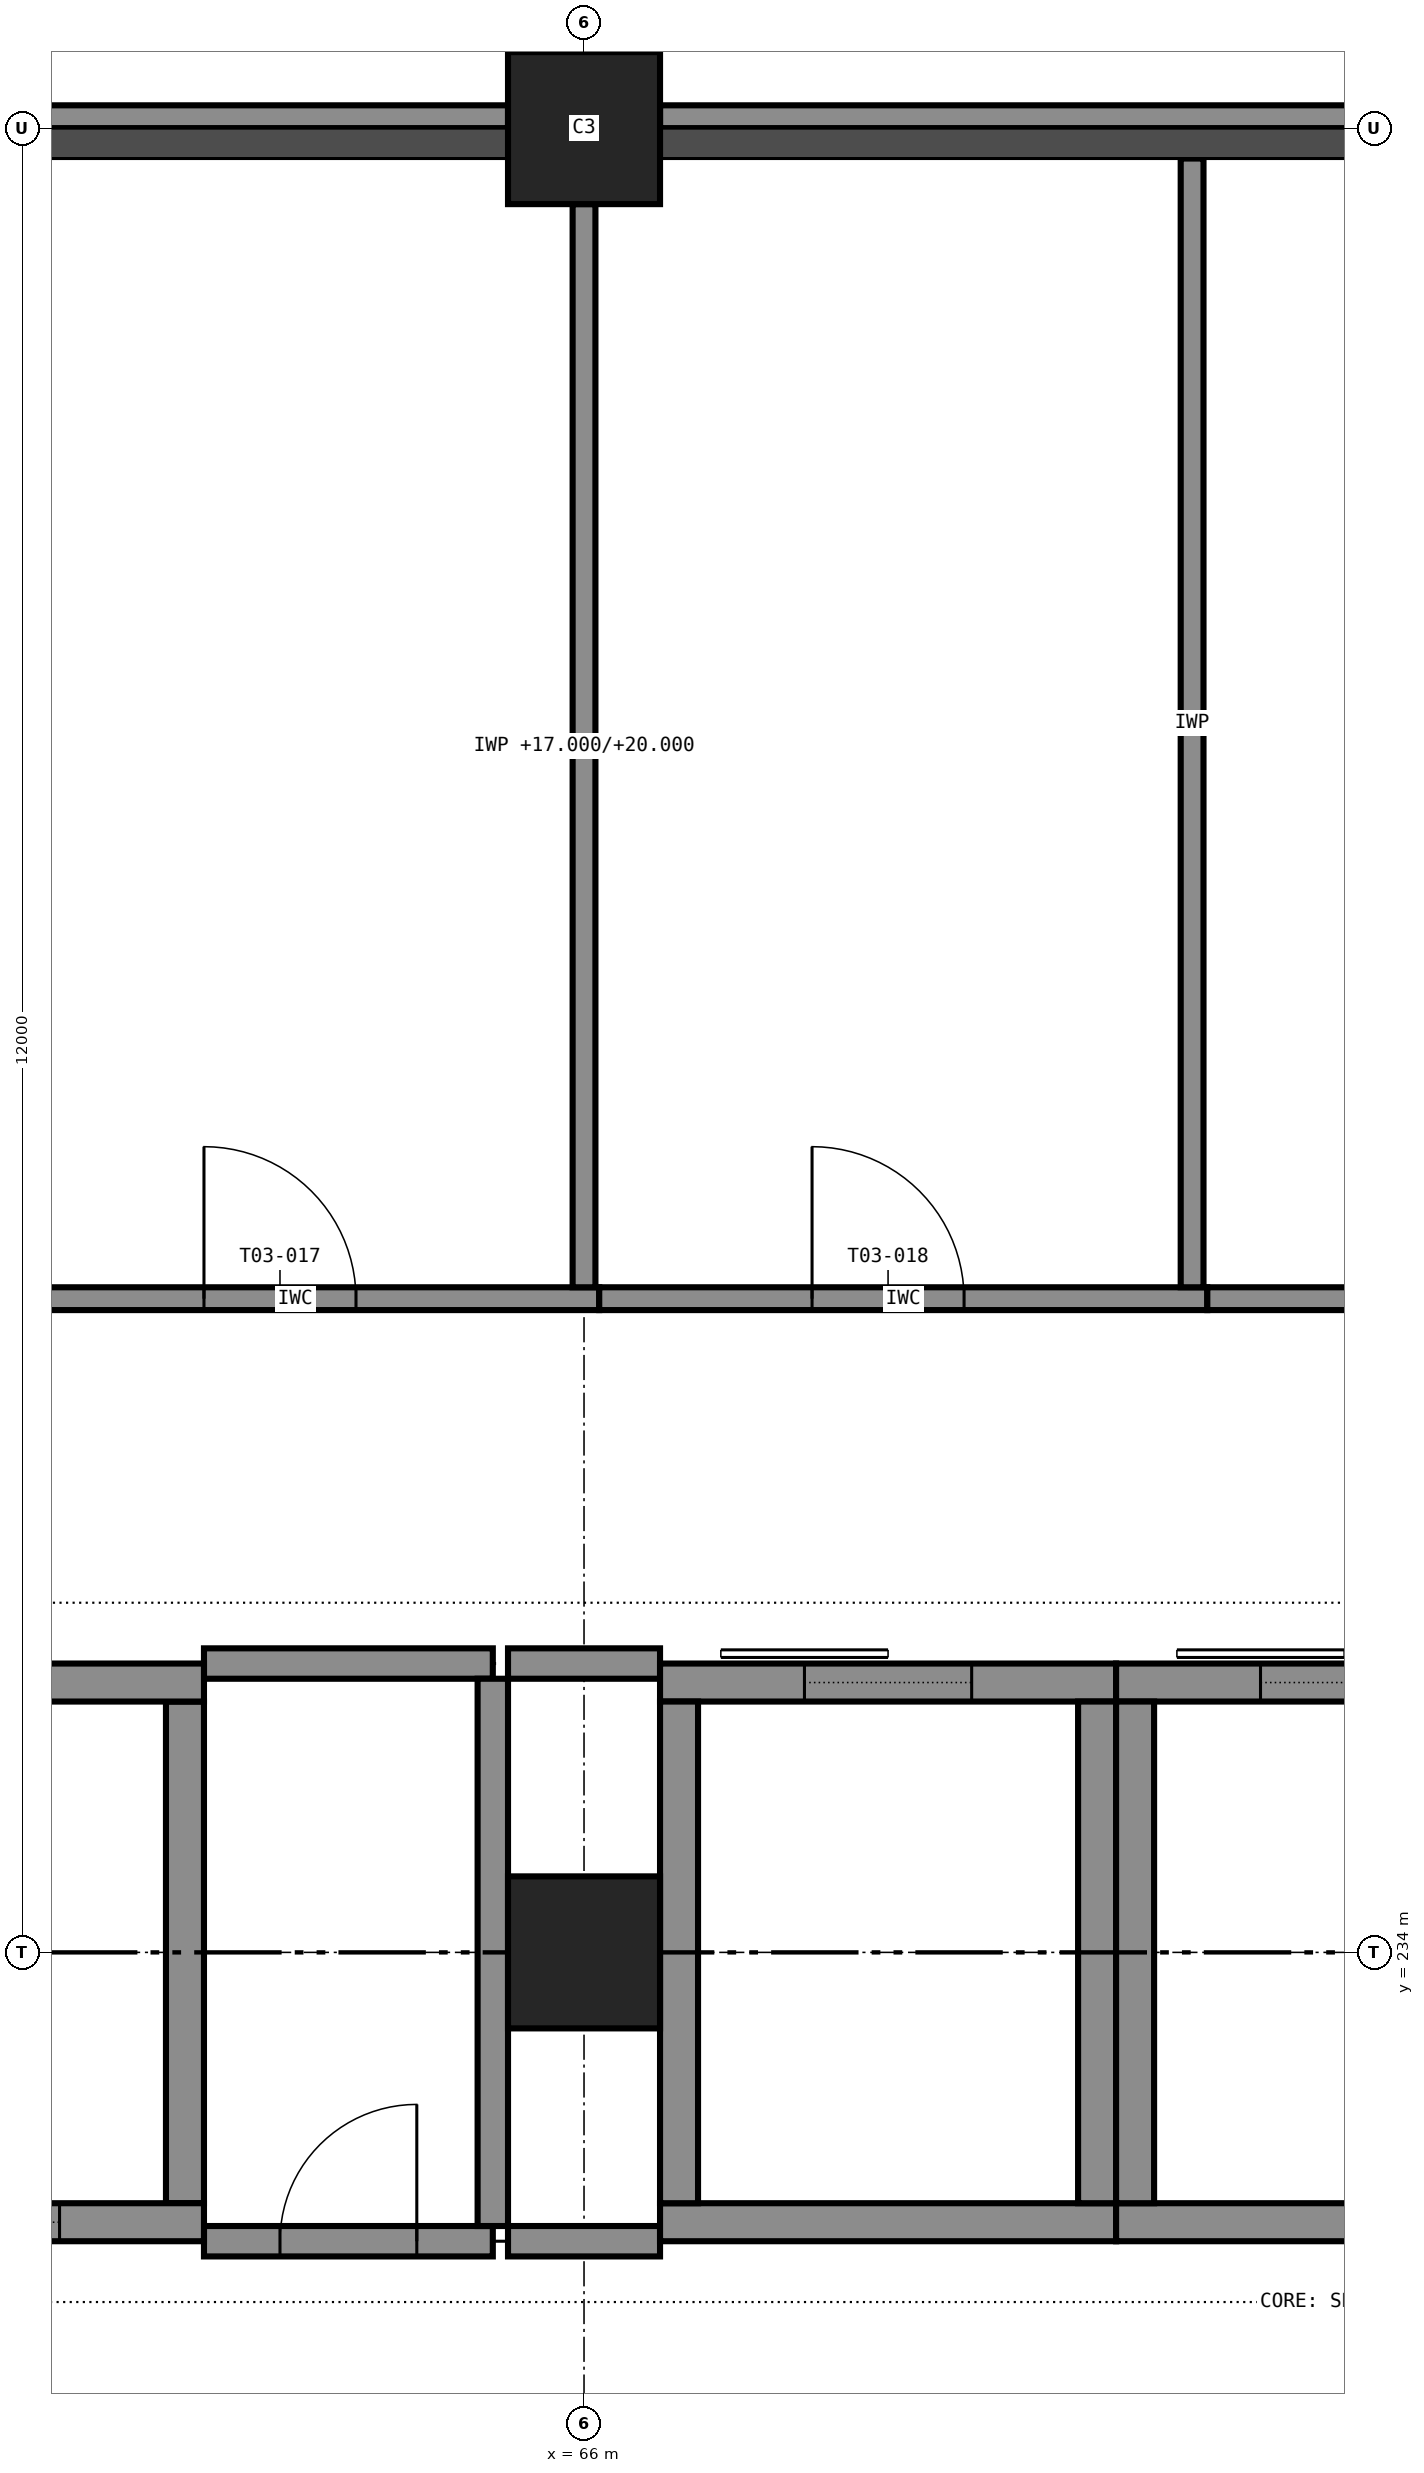
"""IFC4 building model, lengths in metres.
Left out: names, types, materials, properties, quantities, classifications, styles, units other than length and angle.
Written with IfcOpenShell. Run it as: python <this file> out.ifc"""

import sys

from ifc_helpers import new_model, si_unit, direction, frame, frame_2d, origin, origin_2d, place, context, subcontext, project, spatial, rectangle, extrude, element, fill, save


model = new_model("IFC4")
c1 = context("Model", 3, precision=1e-05, world=origin(), true_north=direction((0.0, 1.0)))
c2 = subcontext(c1, "Body", "Model", "MODEL_VIEW")
j1 = project(units=[si_unit("LENGTHUNIT", "METRE"), si_unit("PLANEANGLEUNIT", "RADIAN")], contexts=[c1])
p1 = place(None, origin())
s1 = spatial("IfcSite", under=j1, at=p1, CompositionType="ELEMENT")
p2 = place(p1, origin())
s2 = spatial("IfcBuilding", under=s1, at=p2, CompositionType="ELEMENT")
p3 = place(p2, frame((0.0, 0.0, 17.0)))
s3 = spatial("IfcBuildingStorey", under=s2, at=p3, CompositionType="ELEMENT", Elevation=17.0)
for number, where, z_axis, x_axis in (
    (1, (66.0, 234.0, 0.0), (0.0, 0.0, 1.0), (1.0, 0.0, 0.0)),
    (2, (66.0, 246.0, 0.0), (0.0, 0.0, 1.0), (1.0, 0.0, 0.0)),
):
    element("IfcColumn", number, at=place(p3, frame(where, z_axis=z_axis, x_axis=x_axis)), inside=s3, PredefinedType="COLUMN", context=c2, shape_type="SweptSolid", body=[
        extrude(rectangle(XDim=1.0, YDim=1.0, at=origin_2d()), origin(), (0.0, 0.0, 1.0), 4.0),
    ])
p4 = place(p3, frame((60.5, 232.225, 0.0), z_axis=(0.0, 0.0, 1.0), x_axis=(1.0, 0.0, 0.0)))
e3 = element("IfcWall", 3, at=p4, inside=s3, PredefinedType="SHEAR", context=c2, shape_type="SweptSolid", body=[
    extrude(rectangle(XDim=3.0, YDim=0.25, at=frame_2d((1.5, 0.0))), origin(), (0.0, 0.0, 1.0), 4.0),
])
p5 = place(p4, frame((0.95, 0.0, 0.0)))
e4 = element("IfcOpeningElement", 4, at=p5, cuts=e3, PredefinedType="OPENING", context=c2, shape_type="SweptSolid", body=[
    extrude(rectangle(XDim=1.1, YDim=2.1, at=frame_2d((0.55, 1.05))), frame((0.0, 0.135, 0.0), z_axis=(0.0, -1.0, 0.0), x_axis=(1.0, 0.0, 0.0)), (0.0, 0.0, 1.0), 0.27),
])
p6 = place(p3, frame((60.5, 235.775, 0.0), z_axis=(0.0, 0.0, 1.0), x_axis=(1.0, 0.0, 0.0)))
e5 = element("IfcWall", 5, at=p6, inside=s3, PredefinedType="SHEAR", context=c2, shape_type="SweptSolid", body=[
    extrude(rectangle(XDim=3.0, YDim=0.25, at=frame_2d((1.5, 0.0))), origin(), (0.0, 0.0, 1.0), 4.0),
])
p7 = place(p3, frame((63.375, 232.35, 0.0), z_axis=(0.0, 0.0, 1.0), x_axis=(0.0, 1.0, 0.0)))
e6 = element("IfcWall", 6, at=p7, inside=s3, PredefinedType="SHEAR", context=c2, shape_type="SweptSolid", body=[
    extrude(rectangle(XDim=3.3, YDim=0.25, at=frame_2d((1.65, 0.0))), origin(), (0.0, 0.0, 1.0), 4.0),
])
p8 = place(p3, frame((66.5, 232.225, 0.0), z_axis=(0.0, 0.0, 1.0), x_axis=(1.0, 0.0, 0.0)))
e7 = element("IfcWall", 7, at=p8, inside=s3, PredefinedType="SHEAR", context=c2, shape_type="SweptSolid", body=[
    extrude(rectangle(XDim=3.0, YDim=0.25, at=frame_2d((1.5, 0.0))), origin(), (0.0, 0.0, 1.0), 4.0),
])
p9 = place(p3, frame((66.5, 235.775, 0.0), z_axis=(0.0, 0.0, 1.0), x_axis=(1.0, 0.0, 0.0)))
e8 = element("IfcWall", 8, at=p9, inside=s3, PredefinedType="SHEAR", context=c2, shape_type="SweptSolid", body=[
    extrude(rectangle(XDim=3.0, YDim=0.25, at=frame_2d((1.5, 0.0))), origin(), (0.0, 0.0, 1.0), 4.0),
])
p10 = place(p9, frame((0.95, 0.0, 0.0)))
e9 = element("IfcOpeningElement", 9, at=p10, cuts=e8, PredefinedType="OPENING", context=c2, shape_type="SweptSolid", body=[
    extrude(rectangle(XDim=1.1, YDim=2.1, at=frame_2d((0.55, 1.05))), frame((0.0, 0.135, 0.0), z_axis=(0.0, -1.0, 0.0), x_axis=(1.0, 0.0, 0.0)), (0.0, 0.0, 1.0), 0.27),
])
for number, where, z_axis, x_axis in (
    (10, (66.625, 232.35, 0.0), (0.0, 0.0, 1.0), (0.0, 1.0, 0.0)),
    (11, (69.375, 232.35, 0.0), (0.0, 0.0, 1.0), (0.0, 1.0, 0.0)),
):
    element("IfcWall", number, at=place(p3, frame(where, z_axis=z_axis, x_axis=x_axis)), inside=s3, PredefinedType="SHEAR", context=c2, shape_type="SweptSolid", body=[
        extrude(rectangle(XDim=3.3, YDim=0.25, at=frame_2d((1.65, 0.0))), origin(), (0.0, 0.0, 1.0), 4.0),
    ])
p11 = place(p3, frame((69.5, 232.225, 0.0), z_axis=(0.0, 0.0, 1.0), x_axis=(1.0, 0.0, 0.0)))
e12 = element("IfcWall", 12, at=p11, inside=s3, PredefinedType="SHEAR", context=c2, shape_type="SweptSolid", body=[
    extrude(rectangle(XDim=3.0, YDim=0.25, at=frame_2d((1.5, 0.0))), origin(), (0.0, 0.0, 1.0), 4.0),
])
p12 = place(p3, frame((69.5, 235.775, 0.0), z_axis=(0.0, 0.0, 1.0), x_axis=(1.0, 0.0, 0.0)))
e13 = element("IfcWall", 13, at=p12, inside=s3, PredefinedType="SHEAR", context=c2, shape_type="SweptSolid", body=[
    extrude(rectangle(XDim=3.0, YDim=0.25, at=frame_2d((1.5, 0.0))), origin(), (0.0, 0.0, 1.0), 4.0),
])
p13 = place(p12, frame((0.95, 0.0, 0.0)))
e14 = element("IfcOpeningElement", 14, at=p13, cuts=e13, PredefinedType="OPENING", context=c2, shape_type="SweptSolid", body=[
    extrude(rectangle(XDim=1.1, YDim=2.1, at=frame_2d((0.55, 1.05))), frame((0.0, 0.135, 0.0), z_axis=(0.0, -1.0, 0.0), x_axis=(1.0, 0.0, 0.0)), (0.0, 0.0, 1.0), 0.27),
])
p14 = place(p3, frame((69.625, 232.35, 0.0), z_axis=(0.0, 0.0, 1.0), x_axis=(0.0, 1.0, 0.0)))
e15 = element("IfcWall", 15, at=p14, inside=s3, PredefinedType="SHEAR", context=c2, shape_type="SweptSolid", body=[
    extrude(rectangle(XDim=3.3, YDim=0.25, at=frame_2d((1.65, 0.0))), origin(), (0.0, 0.0, 1.0), 4.0),
])
for number, where, z_axis, x_axis in (
    (16, (77.5, 246.075, 3.8), (0.0, 0.0, 1.0), (-1.0, 0.0, 0.0)),
    (17, (65.5, 246.075, 3.8), (0.0, 0.0, 1.0), (-1.0, 0.0, 0.0)),
):
    element("IfcWall", number, at=place(p3, frame(where, z_axis=z_axis, x_axis=x_axis)), inside=s3, PredefinedType="STANDARD", context=c2, shape_type="SweptSolid", body=[
        extrude(rectangle(XDim=11.0, YDim=0.15, at=frame_2d((5.5, 0.0))), origin(), (0.0, 0.0, 1.0), 0.2),
    ])
p15 = place(p3, frame((63.5, 232.1, 0.0), z_axis=(0.0, 0.0, 1.0), x_axis=(1.0, 0.0, 0.0)))
e18 = element("IfcWall", 18, at=p15, inside=s3, PredefinedType="PARTITIONING", context=c2, shape_type="SweptSolid", body=[
    extrude(rectangle(XDim=1.9, YDim=0.2, at=frame_2d((0.95, 0.0))), origin(), (0.0, 0.0, 1.0), 3.8),
])
p16 = place(p15, frame((0.5, 0.0, 0.0)))
e19 = element("IfcOpeningElement", 19, at=p16, cuts=e18, PredefinedType="OPENING", context=c2, shape_type="SweptSolid", body=[
    extrude(rectangle(XDim=0.9, YDim=2.1, at=frame_2d((0.45, 1.05))), frame((0.0, 0.11, 0.0), z_axis=(0.0, -1.0, 0.0), x_axis=(1.0, 0.0, 0.0)), (0.0, 0.0, 1.0), 0.22),
])
p17 = place(p3, frame((65.5, 232.1, 0.0), z_axis=(0.0, 0.0, 1.0), x_axis=(1.0, 0.0, 0.0)))
e20 = element("IfcWall", 20, at=p17, inside=s3, PredefinedType="PARTITIONING", context=c2, shape_type="SweptSolid", body=[
    extrude(rectangle(XDim=1.0, YDim=0.2, at=frame_2d((0.5, 0.0))), origin(), (0.0, 0.0, 1.0), 3.8),
])
p18 = place(p3, frame((63.5, 235.9, 0.0), z_axis=(0.0, 0.0, 1.0), x_axis=(1.0, 0.0, 0.0)))
e21 = element("IfcWall", 21, at=p18, inside=s3, PredefinedType="PARTITIONING", context=c2, shape_type="SweptSolid", body=[
    extrude(rectangle(XDim=1.9, YDim=0.2, at=frame_2d((0.95, 0.0))), origin(), (0.0, 0.0, 1.0), 3.8),
])
p19 = place(p3, frame((65.5, 235.9, 0.0), z_axis=(0.0, 0.0, 1.0), x_axis=(1.0, 0.0, 0.0)))
e22 = element("IfcWall", 22, at=p19, inside=s3, PredefinedType="PARTITIONING", context=c2, shape_type="SweptSolid", body=[
    extrude(rectangle(XDim=1.0, YDim=0.2, at=frame_2d((0.5, 0.0))), origin(), (0.0, 0.0, 1.0), 3.8),
])
p20 = place(p3, frame((65.4, 232.2, 0.0), z_axis=(0.0, 0.0, 1.0), x_axis=(0.0, 1.0, 0.0)))
e23 = element("IfcWall", 23, at=p20, inside=s3, PredefinedType="PARTITIONING", context=c2, shape_type="SweptSolid", body=[
    extrude(rectangle(XDim=3.6, YDim=0.2, at=frame_2d((1.8, 0.0))), origin(), (0.0, 0.0, 1.0), 3.8),
])
p21 = place(p3, frame((62.1, 238.3, 0.0), z_axis=(0.0, 0.0, 1.0), x_axis=(1.0, 0.0, 0.0)))
e24 = element("IfcWall", 24, at=p21, inside=s3, PredefinedType="PARTITIONING", context=c2, shape_type="SweptSolid", body=[
    extrude(rectangle(XDim=4.0, YDim=0.15, at=frame_2d((2.0, 0.0))), origin(), (0.0, 0.0, 1.0), 3.8),
])
p22 = place(p21, frame((1.4, 0.0, 0.0)))
e25 = element("IfcOpeningElement", 25, at=p22, cuts=e24, PredefinedType="OPENING", context=c2, shape_type="SweptSolid", body=[
    extrude(rectangle(XDim=1.0, YDim=2.1, at=frame_2d((0.5, 1.05))), frame((0.0, 0.085, 0.0), z_axis=(0.0, -1.0, 0.0), x_axis=(1.0, 0.0, 0.0)), (0.0, 0.0, 1.0), 0.17),
])
p23 = place(p3, frame((66.1, 238.3, 0.0), z_axis=(0.0, 0.0, 1.0), x_axis=(1.0, 0.0, 0.0)))
e26 = element("IfcWall", 26, at=p23, inside=s3, PredefinedType="PARTITIONING", context=c2, shape_type="SweptSolid", body=[
    extrude(rectangle(XDim=4.0, YDim=0.15, at=frame_2d((2.0, 0.0))), origin(), (0.0, 0.0, 1.0), 3.8),
])
p24 = place(p23, frame((1.4, 0.0, 0.0)))
e27 = element("IfcOpeningElement", 27, at=p24, cuts=e26, PredefinedType="OPENING", context=c2, shape_type="SweptSolid", body=[
    extrude(rectangle(XDim=1.0, YDim=2.1, at=frame_2d((0.5, 1.05))), frame((0.0, 0.085, 0.0), z_axis=(0.0, -1.0, 0.0), x_axis=(1.0, 0.0, 0.0)), (0.0, 0.0, 1.0), 0.17),
])
p25 = place(p3, frame((66.0, 245.5, 0.0), z_axis=(0.0, 0.0, 1.0), x_axis=(0.0, -1.0, 0.0)))
e28 = element("IfcWall", 28, at=p25, inside=s3, PredefinedType="PARTITIONING", context=c2, shape_type="SweptSolid", body=[
    extrude(rectangle(XDim=7.125, YDim=0.15, at=frame_2d((3.562, 0.0))), origin(), (0.0, 0.0, 1.0), 3.0),
])
p26 = place(p3, frame((70.1, 238.3, 0.0), z_axis=(0.0, 0.0, 1.0), x_axis=(1.0, 0.0, 0.0)))
e29 = element("IfcWall", 29, at=p26, inside=s3, PredefinedType="PARTITIONING", context=c2, shape_type="SweptSolid", body=[
    extrude(rectangle(XDim=4.0, YDim=0.15, at=frame_2d((2.0, 0.0))), origin(), (0.0, 0.0, 1.0), 3.8),
])
p27 = place(p26, frame((1.4, 0.0, 0.0)))
e30 = element("IfcOpeningElement", 30, at=p27, cuts=e29, PredefinedType="OPENING", context=c2, shape_type="SweptSolid", body=[
    extrude(rectangle(XDim=1.0, YDim=2.1, at=frame_2d((0.5, 1.05))), frame((0.0, 0.085, 0.0), z_axis=(0.0, -1.0, 0.0), x_axis=(1.0, 0.0, 0.0)), (0.0, 0.0, 1.0), 0.17),
])
p28 = place(p3, frame((70.0, 245.8, 0.0), z_axis=(0.0, 0.0, 1.0), x_axis=(0.0, -1.0, 0.0)))
e31 = element("IfcWall", 31, at=p28, inside=s3, PredefinedType="PARTITIONING", context=c2, shape_type="SweptSolid", body=[
    extrude(rectangle(XDim=7.425, YDim=0.15, at=frame_2d((3.712, 0.0))), origin(), (0.0, 0.0, 1.0), 3.8),
])
p29 = place(p16, origin())
e32 = element("IfcDoor", 32, at=p29, inside=s3, OperationType="SINGLE_SWING_RIGHT", PredefinedType="DOOR", context=c2, shape_type="SweptSolid", body=[
    extrude(rectangle(XDim=0.9, YDim=2.1, at=frame_2d((0.45, 1.05))), frame((0.0, 0.025, 0.0), z_axis=(0.0, -1.0, 0.0), x_axis=(1.0, 0.0, 0.0)), (0.0, 0.0, 1.0), 0.05),
])
fill(e19, e32)
p30 = place(p22, origin())
e33 = element("IfcDoor", 33, at=p30, inside=s3, OperationType="SINGLE_SWING_LEFT", PredefinedType="DOOR", context=c2, shape_type="SweptSolid", body=[
    extrude(rectangle(XDim=1.0, YDim=2.1, at=frame_2d((0.5, 1.05))), frame((0.0, 0.025, 0.0), z_axis=(0.0, -1.0, 0.0), x_axis=(1.0, 0.0, 0.0)), (0.0, 0.0, 1.0), 0.05),
])
fill(e25, e33)
p31 = place(p24, origin())
e34 = element("IfcDoor", 34, at=p31, inside=s3, OperationType="SINGLE_SWING_LEFT", PredefinedType="DOOR", context=c2, shape_type="SweptSolid", body=[
    extrude(rectangle(XDim=1.0, YDim=2.1, at=frame_2d((0.5, 1.05))), frame((0.0, 0.025, 0.0), z_axis=(0.0, -1.0, 0.0), x_axis=(1.0, 0.0, 0.0)), (0.0, 0.0, 1.0), 0.05),
])
fill(e27, e34)
p32 = place(p5, origin())
e35 = element("IfcDoor", 35, at=p32, inside=s3, OperationType="SLIDING_TO_LEFT", PredefinedType="DOOR", context=c2, shape_type="SweptSolid", body=[
    extrude(rectangle(XDim=1.1, YDim=2.1, at=frame_2d((0.55, 1.05))), frame((0.0, 0.025, 0.0), z_axis=(0.0, -1.0, 0.0), x_axis=(1.0, 0.0, 0.0)), (0.0, 0.0, 1.0), 0.05),
])
fill(e4, e35)
p33 = place(p10, origin())
e36 = element("IfcDoor", 36, at=p33, inside=s3, OperationType="SLIDING_TO_LEFT", PredefinedType="DOOR", context=c2, shape_type="SweptSolid", body=[
    extrude(rectangle(XDim=1.1, YDim=2.1, at=frame_2d((0.55, 1.05))), frame((0.0, 0.025, 0.0), z_axis=(0.0, -1.0, 0.0), x_axis=(1.0, 0.0, 0.0)), (0.0, 0.0, 1.0), 0.05),
])
fill(e9, e36)
p34 = place(p13, origin())
e37 = element("IfcDoor", 37, at=p34, inside=s3, OperationType="SLIDING_TO_LEFT", PredefinedType="DOOR", context=c2, shape_type="SweptSolid", body=[
    extrude(rectangle(XDim=1.1, YDim=2.1, at=frame_2d((0.55, 1.05))), frame((0.0, 0.025, 0.0), z_axis=(0.0, -1.0, 0.0), x_axis=(1.0, 0.0, 0.0)), (0.0, 0.0, 1.0), 0.05),
])
fill(e14, e37)
save(model, sys.argv[1])
